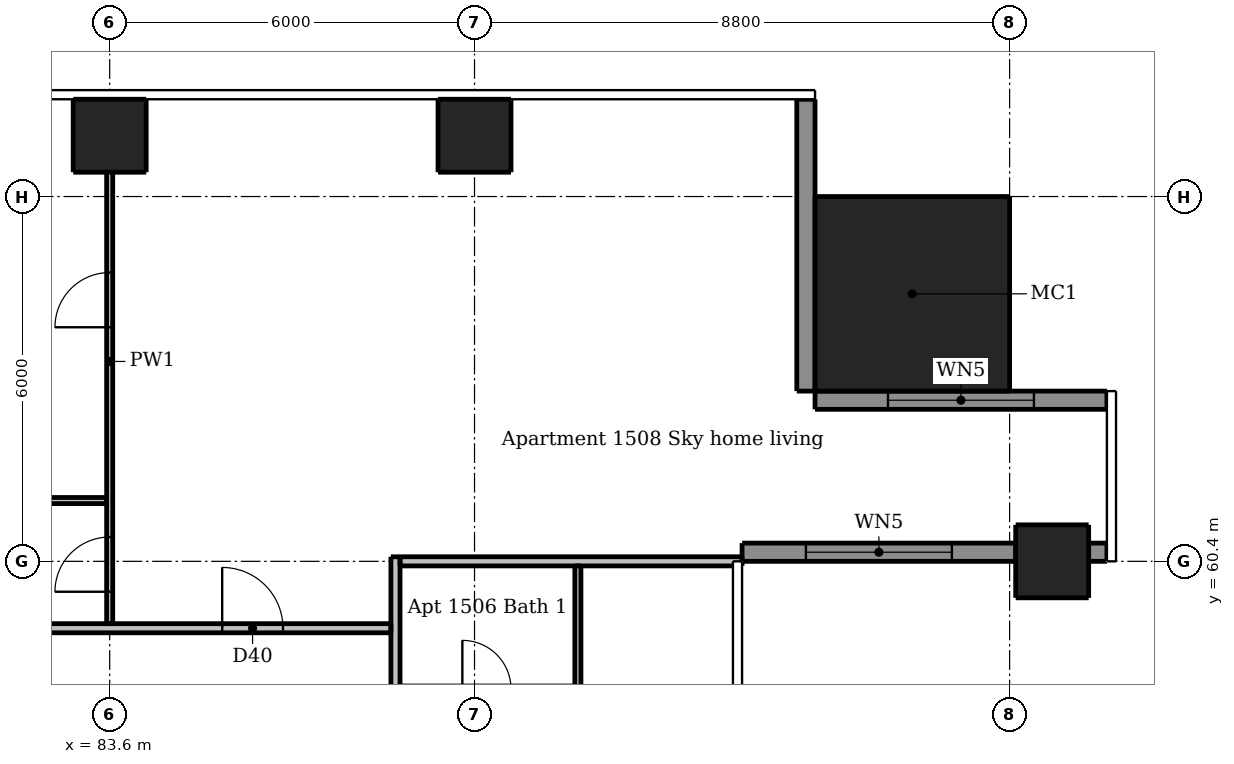
"""IFC4 building model, lengths in metres.
Left out: names, types, materials, properties, quantities, classifications, styles, units other than length and angle.
Written with IfcOpenShell. Run it as: python <this file> out.ifc"""

import sys

from ifc_helpers import new_model, si_unit, direction, frame, frame_2d, origin, origin_2d, place, context, subcontext, project, spatial, rectangle, extrude, element, fill, save


model = new_model("IFC4")
c1 = context("Model", 3, precision=1e-05, world=origin(), true_north=direction((0.0, 1.0)))
c2 = subcontext(c1, "Body", "Model", "MODEL_VIEW")
j1 = project(units=[si_unit("LENGTHUNIT", "METRE"), si_unit("PLANEANGLEUNIT", "RADIAN")], contexts=[c1])
p1 = place(None, origin())
s1 = spatial("IfcSite", under=j1, at=p1, CompositionType="ELEMENT")
p2 = place(p1, origin())
s2 = spatial("IfcBuilding", under=s1, at=p2, CompositionType="ELEMENT")
p3 = place(p2, frame((0.0, 0.0, 56.5)))
s3 = spatial("IfcBuildingStorey", under=s2, at=p3, CompositionType="ELEMENT", Elevation=56.5)
for number, where, z_axis, x_axis in (
    (1, (99.1, 60.4, 0.0), (0.0, 0.0, 1.0), (1.0, 0.0, 0.0)),
    (2, (83.6, 67.4, 0.0), (0.0, 0.0, 1.0), (1.0, 0.0, 0.0)),
    (3, (89.6, 67.4, 0.0), (0.0, 0.0, 1.0), (1.0, 0.0, 0.0)),
):
    element("IfcColumn", number, at=place(p3, frame(where, z_axis=z_axis, x_axis=x_axis)), inside=s3, PredefinedType="COLUMN", context=c2, shape_type="SweptSolid", body=[
        extrude(rectangle(XDim=1.2, YDim=1.2, at=origin_2d()), origin(), (0.0, 0.0, 1.0), 3.05),
    ])
p4 = place(p3, frame((96.8, 64.8, 0.0), z_axis=(0.0, 0.0, 1.0), x_axis=(1.0, 0.0, 0.0)))
e4 = element("IfcColumn", 4, at=p4, inside=s3, PredefinedType="COLUMN", context=c2, shape_type="SweptSolid", body=[
    extrude(rectangle(XDim=3.2, YDim=3.2, at=origin_2d()), origin(), (0.0, 0.0, 1.0), 3.3),
])
p5 = place(p3, frame((94.0, 60.55, 0.0), z_axis=(0.0, 0.0, 1.0), x_axis=(1.0, 0.0, 0.0)))
e5 = element("IfcWall", 5, at=p5, inside=s3, PredefinedType="SOLIDWALL", context=c2, shape_type="SweptSolid", body=[
    extrude(rectangle(XDim=4.5, YDim=0.3, at=frame_2d((2.25, 0.0))), origin(), (0.0, 0.0, 1.0), 3.05),
])
p6 = place(p5, frame((1.05, 0.0, 0.15)))
e6 = element("IfcOpeningElement", 6, at=p6, cuts=e5, PredefinedType="OPENING", context=c2, shape_type="SweptSolid", body=[
    extrude(rectangle(XDim=2.4, YDim=2.1, at=frame_2d((1.2, 1.05))), frame((0.0, 0.16, 0.0), z_axis=(0.0, -1.0, 0.0), x_axis=(1.0, 0.0, 0.0)), (0.0, 0.0, 1.0), 0.32),
])
p7 = place(p3, frame((99.7, 60.55, 0.0), z_axis=(0.0, 0.0, 1.0), x_axis=(1.0, 0.0, 0.0)))
e7 = element("IfcWall", 7, at=p7, inside=s3, PredefinedType="SOLIDWALL", context=c2, shape_type="SweptSolid", body=[
    extrude(rectangle(XDim=0.3, YDim=0.3, at=frame_2d((0.15, 0.0))), origin(), (0.0, 0.0, 1.0), 3.05),
])
p8 = place(p3, frame((100.0, 63.05, 0.0), z_axis=(0.0, 0.0, 1.0), x_axis=(-1.0, 0.0, 0.0)))
e8 = element("IfcWall", 8, at=p8, inside=s3, PredefinedType="SOLIDWALL", context=c2, shape_type="SweptSolid", body=[
    extrude(rectangle(XDim=4.8, YDim=0.3, at=frame_2d((2.4, 0.0))), origin(), (0.0, 0.0, 1.0), 3.05),
])
p9 = place(p8, frame((1.2, 0.0, 0.15)))
e9 = element("IfcOpeningElement", 9, at=p9, cuts=e8, PredefinedType="OPENING", context=c2, shape_type="SweptSolid", body=[
    extrude(rectangle(XDim=2.4, YDim=2.1, at=frame_2d((1.2, 1.05))), frame((0.0, 0.16, 0.0), z_axis=(0.0, -1.0, 0.0), x_axis=(1.0, 0.0, 0.0)), (0.0, 0.0, 1.0), 0.32),
])
p10 = place(p3, frame((95.05, 63.2, 0.0), z_axis=(0.0, 0.0, 1.0), x_axis=(0.0, 1.0, 0.0)))
e10 = element("IfcWall", 10, at=p10, inside=s3, PredefinedType="SOLIDWALL", context=c2, shape_type="SweptSolid", body=[
    extrude(rectangle(XDim=4.8, YDim=0.3, at=frame_2d((2.4, 0.0))), origin(), (0.0, 0.0, 1.0), 3.05),
])
p11 = place(p3, frame((83.6, 59.375, 0.0), z_axis=(0.0, 0.0, 1.0), x_axis=(0.0, 1.0, 0.0)))
e11 = element("IfcWall", 11, at=p11, inside=s3, PredefinedType="PARTITIONING", context=c2, shape_type="SweptSolid", body=[
    extrude(rectangle(XDim=8.625, YDim=0.1, at=frame_2d((4.312, 0.0))), origin(), (0.0, 0.0, 1.0), 2.516),
])
p12 = place(p11, frame((0.525, 0.0, 0.0)))
e12 = element("IfcOpeningElement", 12, at=p12, cuts=e11, PredefinedType="OPENING", context=c2, shape_type="SweptSolid", body=[
    extrude(rectangle(XDim=0.9, YDim=2.1, at=frame_2d((0.45, 1.05))), frame((0.0, 0.06, 0.0), z_axis=(0.0, -1.0, 0.0), x_axis=(1.0, 0.0, 0.0)), (0.0, 0.0, 1.0), 0.12),
])
p13 = place(p11, frame((4.875, 0.0, 0.0)))
e13 = element("IfcOpeningElement", 13, at=p13, cuts=e11, PredefinedType="OPENING", context=c2, shape_type="SweptSolid", body=[
    extrude(rectangle(XDim=0.9, YDim=2.1, at=frame_2d((0.45, 1.05))), frame((0.0, 0.06, 0.0), z_axis=(0.0, -1.0, 0.0), x_axis=(1.0, 0.0, 0.0)), (0.0, 0.0, 1.0), 0.12),
])
p14 = place(p3, frame((91.3, 58.25, 0.0), z_axis=(0.0, 0.0, 1.0), x_axis=(0.0, 1.0, 0.0)))
e14 = element("IfcWall", 14, at=p14, inside=s3, PredefinedType="PARTITIONING", context=c2, shape_type="SweptSolid", body=[
    extrude(rectangle(XDim=2.075, YDim=0.1, at=frame_2d((1.038, 0.0))), origin(), (0.0, 0.0, 1.0), 3.05),
])
p15 = place(p3, frame((83.55, 61.4, 0.0), z_axis=(0.0, 0.0, 1.0), x_axis=(-1.0, 0.0, 0.0)))
e15 = element("IfcWall", 15, at=p15, inside=s3, PredefinedType="PARTITIONING", context=c2, shape_type="SweptSolid", body=[
    extrude(rectangle(XDim=5.875, YDim=0.1, at=frame_2d((2.938, 0.0))), origin(), (0.0, 0.0, 1.0), 3.05),
])
p16 = place(p15, frame((3.75, 0.0, 0.0)))
e16 = element("IfcOpeningElement", 16, at=p16, cuts=e15, PredefinedType="OPENING", context=c2, shape_type="SweptSolid", body=[
    extrude(rectangle(XDim=0.8, YDim=2.1, at=frame_2d((0.4, 1.05))), frame((0.0, 0.06, 0.0), z_axis=(0.0, -1.0, 0.0), x_axis=(1.0, 0.0, 0.0)), (0.0, 0.0, 1.0), 0.12),
])
p17 = place(p3, frame((88.3, 60.475, 0.0), z_axis=(0.0, 0.0, 1.0), x_axis=(0.0, -1.0, 0.0)))
e17 = element("IfcWall", 17, at=p17, inside=s3, PredefinedType="PARTITIONING", context=c2, shape_type="SweptSolid", body=[
    extrude(rectangle(XDim=28.7, YDim=0.15, at=frame_2d((14.35, 0.0))), origin(), (0.0, 0.0, 1.0), 3.05),
])
p18 = place(p17, frame((27.425, 0.0, 0.0)))
e18 = element("IfcOpeningElement", 18, at=p18, cuts=e17, PredefinedType="OPENING", context=c2, shape_type="SweptSolid", body=[
    extrude(rectangle(XDim=1.0, YDim=2.1, at=frame_2d((0.5, 1.05))), frame((0.0, 0.085, 0.0), z_axis=(0.0, -1.0, 0.0), x_axis=(1.0, 0.0, 0.0)), (0.0, 0.0, 1.0), 0.17),
])
p19 = place(p17, frame((11.575, 0.0, 0.0)))
e19 = element("IfcOpeningElement", 19, at=p19, cuts=e17, PredefinedType="OPENING", context=c2, shape_type="SweptSolid", body=[
    extrude(rectangle(XDim=1.0, YDim=2.1, at=frame_2d((0.5, 1.05))), frame((0.0, 0.085, 0.0), z_axis=(0.0, -1.0, 0.0), x_axis=(1.0, 0.0, 0.0)), (0.0, 0.0, 1.0), 0.17),
])
p20 = place(p17, frame((2.575, 0.0, 0.0)))
e20 = element("IfcOpeningElement", 20, at=p20, cuts=e17, PredefinedType="OPENING", context=c2, shape_type="SweptSolid", body=[
    extrude(rectangle(XDim=1.0, YDim=2.1, at=frame_2d((0.5, 1.05))), frame((0.0, 0.085, 0.0), z_axis=(0.0, -1.0, 0.0), x_axis=(1.0, 0.0, 0.0)), (0.0, 0.0, 1.0), 0.17),
])
p21 = place(p3, frame((88.375, 60.4, 0.0), z_axis=(0.0, 0.0, 1.0), x_axis=(1.0, 0.0, 0.0)))
e21 = element("IfcWall", 21, at=p21, inside=s3, PredefinedType="PARTITIONING", context=c2, shape_type="SweptSolid", body=[
    extrude(rectangle(XDim=5.625, YDim=0.15, at=frame_2d((2.812, 0.0))), origin(), (0.0, 0.0, 1.0), 2.516),
])
p22 = place(p3, frame((59.675, 59.3, 0.0), z_axis=(0.0, 0.0, 1.0), x_axis=(1.0, 0.0, 0.0)))
e22 = element("IfcWall", 22, at=p22, inside=s3, PredefinedType="PARTITIONING", context=c2, shape_type="SweptSolid", body=[
    extrude(rectangle(XDim=28.55, YDim=0.15, at=frame_2d((14.275, 0.0))), origin(), (0.0, 0.0, 1.0), 3.05),
])
p23 = place(p22, frame((6.925, 0.0, 0.0)))
e23 = element("IfcOpeningElement", 23, at=p23, cuts=e22, PredefinedType="OPENING", context=c2, shape_type="SweptSolid", body=[
    extrude(rectangle(XDim=1.0, YDim=2.1, at=frame_2d((0.5, 1.05))), frame((0.0, 0.085, 0.0), z_axis=(0.0, -1.0, 0.0), x_axis=(1.0, 0.0, 0.0)), (0.0, 0.0, 1.0), 0.17),
])
p24 = place(p22, frame((25.775, 0.0, 0.0)))
e24 = element("IfcOpeningElement", 24, at=p24, cuts=e22, PredefinedType="OPENING", context=c2, shape_type="SweptSolid", body=[
    extrude(rectangle(XDim=1.0, YDim=2.1, at=frame_2d((0.5, 1.05))), frame((0.0, 0.085, 0.0), z_axis=(0.0, -1.0, 0.0), x_axis=(1.0, 0.0, 0.0)), (0.0, 0.0, 1.0), 0.17),
])
p25 = place(p6, origin())
e25 = element("IfcWindow", 25, at=p25, inside=s3, PartitioningType="DOUBLE_PANEL_VERTICAL", PredefinedType="WINDOW", context=c2, shape_type="SweptSolid", body=[
    extrude(rectangle(XDim=2.4, YDim=2.1, at=frame_2d((1.2, 1.05))), frame((0.0, 0.03, 0.0), z_axis=(0.0, -1.0, 0.0), x_axis=(1.0, 0.0, 0.0)), (0.0, 0.0, 1.0), 0.06),
])
fill(e6, e25)
p26 = place(p9, origin())
e26 = element("IfcWindow", 26, at=p26, inside=s3, PartitioningType="DOUBLE_PANEL_VERTICAL", PredefinedType="WINDOW", context=c2, shape_type="SweptSolid", body=[
    extrude(rectangle(XDim=2.4, YDim=2.1, at=frame_2d((1.2, 1.05))), frame((0.0, 0.03, 0.0), z_axis=(0.0, -1.0, 0.0), x_axis=(1.0, 0.0, 0.0)), (0.0, 0.0, 1.0), 0.06),
])
fill(e9, e26)
p27 = place(p24, origin())
e27 = element("IfcDoor", 27, at=p27, inside=s3, OperationType="SINGLE_SWING_LEFT", PredefinedType="DOOR", context=c2, shape_type="SweptSolid", body=[
    extrude(rectangle(XDim=1.0, YDim=2.1, at=frame_2d((0.5, 1.05))), frame((0.0, 0.025, 0.0), z_axis=(0.0, -1.0, 0.0), x_axis=(1.0, 0.0, 0.0)), (0.0, 0.0, 1.0), 0.05),
])
fill(e24, e27)
p28 = place(p12, origin())
e28 = element("IfcDoor", 28, at=p28, inside=s3, OperationType="SINGLE_SWING_LEFT", PredefinedType="DOOR", context=c2, shape_type="SweptSolid", body=[
    extrude(rectangle(XDim=0.9, YDim=2.1, at=frame_2d((0.45, 1.05))), frame((0.0, 0.025, 0.0), z_axis=(0.0, -1.0, 0.0), x_axis=(1.0, 0.0, 0.0)), (0.0, 0.0, 1.0), 0.05),
])
fill(e12, e28)
p29 = place(p13, origin())
e29 = element("IfcDoor", 29, at=p29, inside=s3, OperationType="SINGLE_SWING_LEFT", PredefinedType="DOOR", context=c2, shape_type="SweptSolid", body=[
    extrude(rectangle(XDim=0.9, YDim=2.1, at=frame_2d((0.45, 1.05))), frame((0.0, 0.025, 0.0), z_axis=(0.0, -1.0, 0.0), x_axis=(1.0, 0.0, 0.0)), (0.0, 0.0, 1.0), 0.05),
])
fill(e13, e29)
save(model, sys.argv[1])
